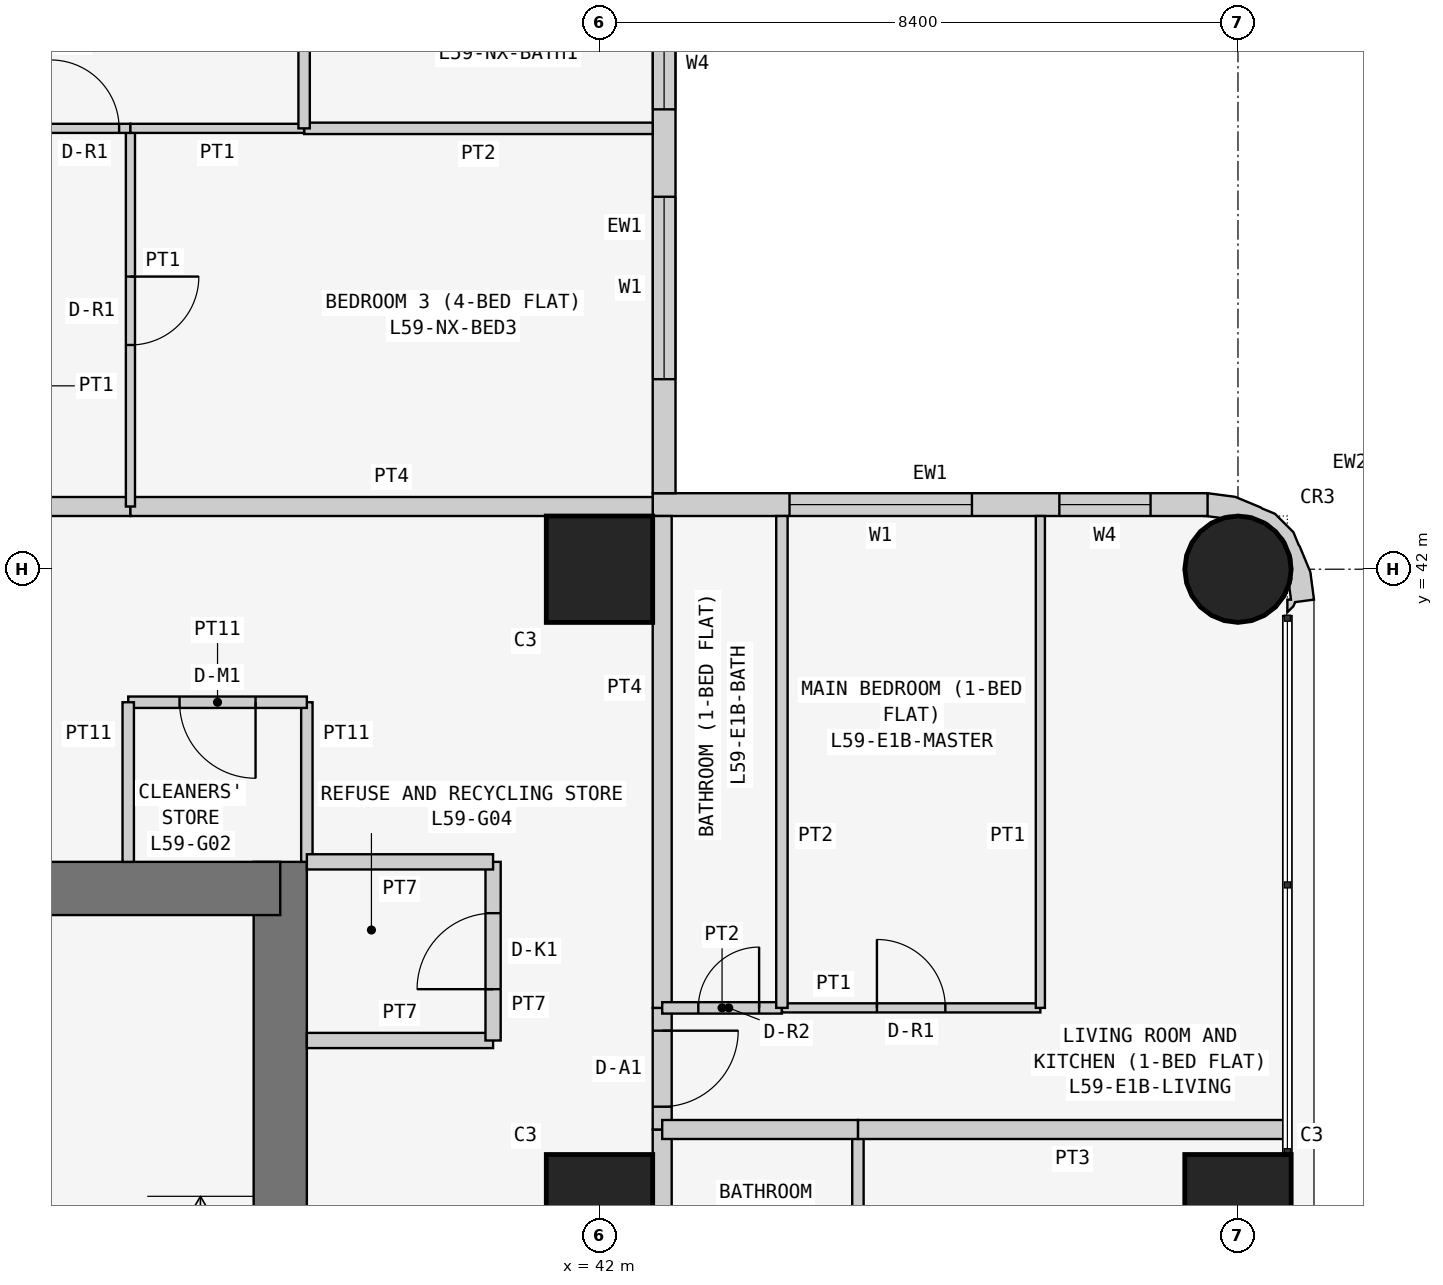
"""IFC4 building model, lengths in metres.
Left out: names, types, materials, properties, quantities, classifications, styles, units other than length and angle.
Written with IfcOpenShell. Run it as: python <this file> out.ifc"""

import sys

from ifc_helpers import new_model, si_unit, direction, frame, frame_2d, origin, origin_2d, place, context, subcontext, project, spatial, polyline, rectangle, circle, outline, extrude, element, fill, save


model = new_model("IFC4")
c1 = context("Model", 3, precision=1e-05, world=origin(), true_north=direction((0.0, 1.0)))
c2 = subcontext(c1, "Body", "Model", "MODEL_VIEW")
j1 = project(units=[si_unit("LENGTHUNIT", "METRE"), si_unit("PLANEANGLEUNIT", "RADIAN")], contexts=[c1])
p1 = place(None, origin())
s1 = spatial("IfcSite", under=j1, at=p1, CompositionType="ELEMENT")
p2 = place(p1, origin())
s2 = spatial("IfcBuilding", under=s1, at=p2, CompositionType="ELEMENT")
p3 = place(p2, frame((0.0, 0.0, 226.5)))
s3 = spatial("IfcBuildingStorey", under=s2, at=p3, CompositionType="ELEMENT", Elevation=226.5)
for number, where, z_axis, x_axis in (
    (1, (42.0, 33.6, 0.0), (0.0, 0.0, 1.0), (1.0, 0.0, 0.0)),
    (2, (42.0, 42.0, 0.0), (0.0, 0.0, 1.0), (1.0, 0.0, 0.0)),
    (3, (50.4, 33.6, 0.0), (0.0, 0.0, 1.0), (1.0, 0.0, 0.0)),
):
    element("IfcColumn", number, at=place(p3, frame(where, z_axis=z_axis, x_axis=x_axis)), inside=s3, PredefinedType="COLUMN", context=c2, shape_type="SweptSolid", body=[
        extrude(rectangle(XDim=1.4, YDim=1.4, at=origin_2d()), origin(), (0.0, 0.0, 1.0), 3.6),
    ])
p4 = place(p3, frame((50.4, 42.0, 0.0), z_axis=(0.0, 0.0, 1.0), x_axis=(1.0, 0.0, 0.0)))
e4 = element("IfcColumn", 4, at=p4, inside=s3, PredefinedType="COLUMN", context=c2, shape_type="SweptSolid", body=[
    extrude(circle(Radius=0.7, at=origin_2d()), origin(), (0.0, 0.0, 1.0), 3.6),
])
p5 = place(p3, frame((37.8, 21.0, 0.0), z_axis=(0.0, 0.0, 1.0), x_axis=(0.0, 1.0, 0.0)))
e5 = element("IfcWall", 5, at=p5, inside=s3, PredefinedType="SHEAR", context=c2, shape_type="SweptSolid", body=[
    extrude(rectangle(XDim=17.15, YDim=0.7, at=frame_2d((8.575, 0.0))), origin(), (0.0, 0.0, 1.0), 3.6),
])
p6 = place(p5, frame((5.2, 0.0, 0.0)))
e6 = element("IfcOpeningElement", 6, at=p6, cuts=e5, PredefinedType="OPENING", context=c2, shape_type="SweptSolid", body=[
    extrude(rectangle(XDim=1.2, YDim=2.1, at=frame_2d((0.6, 1.05))), frame((0.0, 0.36, 0.0), z_axis=(0.0, -1.0, 0.0), x_axis=(1.0, 0.0, 0.0)), (0.0, 0.0, 1.0), 0.72),
])
p7 = place(p3, frame((37.8, 37.8, 0.0), z_axis=(0.0, 0.0, 1.0), x_axis=(-1.0, 0.0, 0.0)))
e7 = element("IfcWall", 7, at=p7, inside=s3, PredefinedType="SHEAR", context=c2, shape_type="SweptSolid", body=[
    extrude(rectangle(XDim=17.15, YDim=0.7, at=frame_2d((8.575, 0.0))), origin(), (0.0, 0.0, 1.0), 3.6),
])
p8 = place(p3, frame((50.0, 42.85, 0.0), z_axis=(0.0, 0.0, 1.0), x_axis=(-1.0, 0.0, 0.0)))
e8 = element("IfcWall", 8, at=p8, inside=s3, PredefinedType="SOLIDWALL", context=c2, shape_type="SweptSolid", body=[
    extrude(rectangle(XDim=7.3, YDim=0.3, at=frame_2d((3.65, 0.0))), origin(), (0.0, 0.0, 1.0), 3.45),
])
p9 = place(p8, frame((3.1, 0.0, 0.9)))
e9 = element("IfcOpeningElement", 9, at=p9, cuts=e8, PredefinedType="OPENING", context=c2, shape_type="SweptSolid", body=[
    extrude(rectangle(XDim=2.4, YDim=1.5, at=frame_2d((1.2, 0.75))), frame((0.0, 0.16, 0.0), z_axis=(0.0, -1.0, 0.0), x_axis=(1.0, 0.0, 0.0)), (0.0, 0.0, 1.0), 0.32),
])
p10 = place(p8, frame((0.75, 0.0, 0.9)))
e10 = element("IfcOpeningElement", 10, at=p10, cuts=e8, PredefinedType="OPENING", context=c2, shape_type="SweptSolid", body=[
    extrude(rectangle(XDim=1.2, YDim=1.5, at=frame_2d((0.6, 0.75))), frame((0.0, 0.16, 0.0), z_axis=(0.0, -1.0, 0.0), x_axis=(1.0, 0.0, 0.0)), (0.0, 0.0, 1.0), 0.32),
])
p11 = place(p3, frame((42.85, 43.0, 0.0), z_axis=(0.0, 0.0, 1.0), x_axis=(0.0, 1.0, 0.0)))
e11 = element("IfcWall", 11, at=p11, inside=s3, PredefinedType="SOLIDWALL", context=c2, shape_type="SweptSolid", body=[
    extrude(rectangle(XDim=7.0, YDim=0.3, at=frame_2d((3.5, 0.0))), origin(), (0.0, 0.0, 1.0), 3.45),
])
p12 = place(p11, frame((1.5, 0.0, 0.9)))
e12 = element("IfcOpeningElement", 12, at=p12, cuts=e11, PredefinedType="OPENING", context=c2, shape_type="SweptSolid", body=[
    extrude(rectangle(XDim=2.4, YDim=1.5, at=frame_2d((1.2, 0.75))), frame((0.0, 0.16, 0.0), z_axis=(0.0, -1.0, 0.0), x_axis=(1.0, 0.0, 0.0)), (0.0, 0.0, 1.0), 0.32),
])
p13 = place(p11, frame((5.05, 0.0, 0.9)))
e13 = element("IfcOpeningElement", 13, at=p13, cuts=e11, PredefinedType="OPENING", context=c2, shape_type="SweptSolid", body=[
    extrude(rectangle(XDim=1.2, YDim=1.5, at=frame_2d((0.6, 0.75))), frame((0.0, 0.16, 0.0), z_axis=(0.0, -1.0, 0.0), x_axis=(1.0, 0.0, 0.0)), (0.0, 0.0, 1.0), 0.32),
])
p14 = place(p3, frame((50.988, 41.488, 0.0), z_axis=(0.0, 0.0, 1.0), x_axis=(0.898030234854, 0.439933741929, 0.0)))
e14 = element("IfcWall", 14, at=p14, inside=s3, PredefinedType="SOLIDWALL", context=c2, shape_type="SweptSolid", body=[
    extrude(outline(polyline([(0.138, -0.04), (0.182, -0.0), (0.419, -0.08), (0.536, 0.266), (0.559, 0.631), (0.555, 0.651), (0.566, 0.836), (0.455, 1.159), (0.333, 1.298), (0.324, 1.317), (0.082, 1.591), (-0.222, 1.793), (-0.39, 1.541), (-0.372, 1.532), (-0.195, 1.414), (-0.12, 1.41), (0.131, 1.287), (0.315, 1.078), (0.406, 0.814), (0.388, 0.536), (0.265, 0.285), (0.209, 0.235), (0.148, 0.053), (0.105, 0.074), (0.032, -0.076), (0.138, -0.04)])), origin(), (0.0, 0.0, 1.0), 3.45),
])
p15 = place(p3, frame((38.15, 38.15, 0.0), z_axis=(0.0, 0.0, 1.0), x_axis=(0.0, 1.0, 0.0)))
e15 = element("IfcWall", 15, at=p15, inside=s3, PredefinedType="PARTITIONING", context=c2, shape_type="SweptSolid", body=[
    extrude(rectangle(XDim=2.1, YDim=0.15, at=frame_2d((1.05, 0.0))), origin(), (0.0, 0.0, 1.0), 3.45),
])
p16 = place(p3, frame((38.15, 40.25, 0.0), z_axis=(0.0, 0.0, 1.0), x_axis=(-1.0, 0.0, 0.0)))
e16 = element("IfcWall", 16, at=p16, inside=s3, PredefinedType="PARTITIONING", context=c2, shape_type="SweptSolid", body=[
    extrude(rectangle(XDim=2.35, YDim=0.15, at=frame_2d((1.175, 0.0))), origin(), (0.0, 0.0, 1.0), 3.45),
])
p17 = place(p16, frame((0.675, 0.0, 0.0)))
e17 = element("IfcOpeningElement", 17, at=p17, cuts=e16, PredefinedType="OPENING", context=c2, shape_type="SweptSolid", body=[
    extrude(rectangle(XDim=1.0, YDim=2.1, at=frame_2d((0.5, 1.05))), frame((0.0, 0.085, 0.0), z_axis=(0.0, -1.0, 0.0), x_axis=(1.0, 0.0, 0.0)), (0.0, 0.0, 1.0), 0.17),
])
p18 = place(p3, frame((35.8, 40.25, 0.0), z_axis=(0.0, 0.0, 1.0), x_axis=(0.0, -1.0, 0.0)))
e18 = element("IfcWall", 18, at=p18, inside=s3, PredefinedType="PARTITIONING", context=c2, shape_type="SweptSolid", body=[
    extrude(rectangle(XDim=2.1, YDim=0.15, at=frame_2d((1.05, 0.0))), origin(), (0.0, 0.0, 1.0), 3.45),
])
p19 = place(p3, frame((38.15, 35.8, 0.0), z_axis=(0.0, 0.0, 1.0), x_axis=(1.0, 0.0, 0.0)))
e19 = element("IfcWall", 19, at=p19, inside=s3, PredefinedType="PARTITIONING", context=c2, shape_type="SweptSolid", body=[
    extrude(rectangle(XDim=2.45, YDim=0.2, at=frame_2d((1.225, 0.0))), origin(), (0.0, 0.0, 1.0), 3.45),
])
p20 = place(p3, frame((40.6, 35.8, 0.0), z_axis=(0.0, 0.0, 1.0), x_axis=(0.0, 1.0, 0.0)))
e20 = element("IfcWall", 20, at=p20, inside=s3, PredefinedType="PARTITIONING", context=c2, shape_type="SweptSolid", body=[
    extrude(rectangle(XDim=2.35, YDim=0.2, at=frame_2d((1.175, 0.0))), origin(), (0.0, 0.0, 1.0), 3.45),
])
p21 = place(p20, frame((0.675, 0.0, 0.0)))
e21 = element("IfcOpeningElement", 21, at=p21, cuts=e20, PredefinedType="OPENING", context=c2, shape_type="SweptSolid", body=[
    extrude(rectangle(XDim=1.0, YDim=2.1, at=frame_2d((0.5, 1.05))), frame((0.0, 0.11, 0.0), z_axis=(0.0, -1.0, 0.0), x_axis=(1.0, 0.0, 0.0)), (0.0, 0.0, 1.0), 0.22),
])
p22 = place(p3, frame((40.6, 38.15, 0.0), z_axis=(0.0, 0.0, 1.0), x_axis=(-1.0, 0.0, 0.0)))
e22 = element("IfcWall", 22, at=p22, inside=s3, PredefinedType="PARTITIONING", context=c2, shape_type="SweptSolid", body=[
    extrude(rectangle(XDim=2.45, YDim=0.2, at=frame_2d((1.225, 0.0))), origin(), (0.0, 0.0, 1.0), 3.45),
])
p23 = place(p3, frame((34.629, 42.825, 0.0), z_axis=(0.0, 0.0, 1.0), x_axis=(1.0, 0.0, 0.0)))
e23 = element("IfcWall", 23, at=p23, inside=s3, PredefinedType="PARTITIONING", context=c2, shape_type="SweptSolid", body=[
    extrude(rectangle(XDim=1.2, YDim=0.25, at=frame_2d((0.6, 0.0))), origin(), (0.0, 0.0, 1.0), 3.45),
])
p24 = place(p3, frame((35.829, 42.825, 0.0), z_axis=(0.0, 0.0, 1.0), x_axis=(1.0, 0.0, 0.0)))
e24 = element("IfcWall", 24, at=p24, inside=s3, PredefinedType="PARTITIONING", context=c2, shape_type="SweptSolid", body=[
    extrude(rectangle(XDim=6.871, YDim=0.25, at=frame_2d((3.436, 0.0))), origin(), (0.0, 0.0, 1.0), 3.45),
])
p25 = place(p3, frame((42.825, 34.629, 0.0), z_axis=(0.0, 0.0, 1.0), x_axis=(0.0, -1.0, 0.0)))
e25 = element("IfcWall", 25, at=p25, inside=s3, PredefinedType="PARTITIONING", context=c2, shape_type="SweptSolid", body=[
    extrude(rectangle(XDim=2.629, YDim=0.25, at=frame_2d((1.314, 0.0))), origin(), (0.0, 0.0, 1.0), 3.45),
])
p26 = place(p3, frame((42.825, 36.229, 0.0), z_axis=(0.0, 0.0, 1.0), x_axis=(0.0, -1.0, 0.0)))
e26 = element("IfcWall", 26, at=p26, inside=s3, PredefinedType="PARTITIONING", context=c2, shape_type="SweptSolid", body=[
    extrude(rectangle(XDim=1.6, YDim=0.25, at=frame_2d((0.8, 0.0))), origin(), (0.0, 0.0, 1.0), 3.45),
])
p27 = place(p26, frame((0.3, 0.0, 0.0)))
e27 = element("IfcOpeningElement", 27, at=p27, cuts=e26, PredefinedType="OPENING", context=c2, shape_type="SweptSolid", body=[
    extrude(rectangle(XDim=1.0, YDim=2.1, at=frame_2d((0.5, 1.05))), frame((0.0, 0.135, 0.0), z_axis=(0.0, -1.0, 0.0), x_axis=(1.0, 0.0, 0.0)), (0.0, 0.0, 1.0), 0.27),
])
p28 = place(p3, frame((42.825, 42.7, 0.0), z_axis=(0.0, 0.0, 1.0), x_axis=(0.0, -1.0, 0.0)))
e28 = element("IfcWall", 28, at=p28, inside=s3, PredefinedType="PARTITIONING", context=c2, shape_type="SweptSolid", body=[
    extrude(rectangle(XDim=6.471, YDim=0.25, at=frame_2d((3.235, 0.0))), origin(), (0.0, 0.0, 1.0), 3.45),
])
p29 = place(p3, frame((35.829, 47.8, 0.0), z_axis=(0.0, 0.0, 1.0), x_axis=(0.0, -1.0, 0.0)))
e29 = element("IfcWall", 29, at=p29, inside=s3, PredefinedType="PARTITIONING", context=c2, shape_type="SweptSolid", body=[
    extrude(rectangle(XDim=4.975, YDim=0.12, at=frame_2d((2.488, 0.0))), origin(), (0.0, 0.0, 1.0), 3.45),
])
p30 = place(p29, frame((1.95, 0.0, 0.0)))
e30 = element("IfcOpeningElement", 30, at=p30, cuts=e29, PredefinedType="OPENING", context=c2, shape_type="SweptSolid", body=[
    extrude(rectangle(XDim=0.9, YDim=2.1, at=frame_2d((0.45, 1.05))), frame((0.0, 0.07, 0.0), z_axis=(0.0, -1.0, 0.0), x_axis=(1.0, 0.0, 0.0)), (0.0, 0.0, 1.0), 0.14),
])
p31 = place(p3, frame((34.629, 47.8, 0.0), z_axis=(0.0, 0.0, 1.0), x_axis=(1.0, 0.0, 0.0)))
e31 = element("IfcWall", 31, at=p31, inside=s3, PredefinedType="PARTITIONING", context=c2, shape_type="SweptSolid", body=[
    extrude(rectangle(XDim=1.2, YDim=0.12, at=frame_2d((0.6, 0.0))), origin(), (0.0, 0.0, 1.0), 3.45),
])
p32 = place(p31, frame((0.151, 0.0, 0.0)))
e32 = element("IfcOpeningElement", 32, at=p32, cuts=e31, PredefinedType="OPENING", context=c2, shape_type="SweptSolid", body=[
    extrude(rectangle(XDim=0.9, YDim=2.1, at=frame_2d((0.45, 1.05))), frame((0.0, 0.07, 0.0), z_axis=(0.0, -1.0, 0.0), x_axis=(1.0, 0.0, 0.0)), (0.0, 0.0, 1.0), 0.14),
])
p33 = place(p3, frame((42.7, 47.8, 0.0), z_axis=(0.0, 0.0, 1.0), x_axis=(-1.0, 0.0, 0.0)))
e33 = element("IfcWall", 33, at=p33, inside=s3, PredefinedType="PARTITIONING", context=c2, shape_type="SweptSolid", body=[
    extrude(rectangle(XDim=4.586, YDim=0.15, at=frame_2d((2.293, 0.0))), origin(), (0.0, 0.0, 1.0), 3.45),
])
p34 = place(p3, frame((38.114, 47.8, 0.0), z_axis=(0.0, 0.0, 1.0), x_axis=(-1.0, 0.0, 0.0)))
e34 = element("IfcWall", 34, at=p34, inside=s3, PredefinedType="PARTITIONING", context=c2, shape_type="SweptSolid", body=[
    extrude(rectangle(XDim=2.285, YDim=0.12, at=frame_2d((1.143, 0.0))), origin(), (0.0, 0.0, 1.0), 3.45),
])
p35 = place(p3, frame((38.114, 51.05, 0.0), z_axis=(0.0, 0.0, 1.0), x_axis=(0.0, -1.0, 0.0)))
e35 = element("IfcWall", 35, at=p35, inside=s3, PredefinedType="PARTITIONING", context=c2, shape_type="SweptSolid", body=[
    extrude(rectangle(XDim=3.25, YDim=0.15, at=frame_2d((1.625, 0.0))), origin(), (0.0, 0.0, 1.0), 3.45),
])
p36 = place(p35, frame((1.35, 0.0, 0.0)))
e36 = element("IfcOpeningElement", 36, at=p36, cuts=e35, PredefinedType="OPENING", context=c2, shape_type="SweptSolid", body=[
    extrude(rectangle(XDim=0.8, YDim=2.1, at=frame_2d((0.4, 1.05))), frame((0.0, 0.085, 0.0), z_axis=(0.0, -1.0, 0.0), x_axis=(1.0, 0.0, 0.0)), (0.0, 0.0, 1.0), 0.17),
])
p37 = place(p3, frame((45.4, 32.0, 0.0), z_axis=(0.0, 0.0, 1.0), x_axis=(0.0, 1.0, 0.0)))
e37 = element("IfcWall", 37, at=p37, inside=s3, PredefinedType="PARTITIONING", context=c2, shape_type="SweptSolid", body=[
    extrude(rectangle(XDim=2.629, YDim=0.15, at=frame_2d((1.314, 0.0))), origin(), (0.0, 0.0, 1.0), 3.45),
])
p38 = place(p3, frame((45.4, 34.629, 0.0), z_axis=(0.0, 0.0, 1.0), x_axis=(1.0, 0.0, 0.0)))
e38 = element("IfcWall", 38, at=p38, inside=s3, PredefinedType="PARTITIONING", context=c2, shape_type="SweptSolid", body=[
    extrude(rectangle(XDim=5.65, YDim=0.25, at=frame_2d((2.825, 0.0))), origin(), (0.0, 0.0, 1.0), 3.45),
])
p39 = place(p3, frame((45.4, 34.629, 0.0), z_axis=(0.0, 0.0, 1.0), x_axis=(-1.0, 0.0, 0.0)))
e39 = element("IfcWall", 39, at=p39, inside=s3, PredefinedType="PARTITIONING", context=c2, shape_type="SweptSolid", body=[
    extrude(rectangle(XDim=2.575, YDim=0.25, at=frame_2d((1.288, 0.0))), origin(), (0.0, 0.0, 1.0), 3.45),
])
p40 = place(p3, frame((42.825, 36.229, 0.0), z_axis=(0.0, 0.0, 1.0), x_axis=(1.0, 0.0, 0.0)))
e40 = element("IfcWall", 40, at=p40, inside=s3, PredefinedType="PARTITIONING", context=c2, shape_type="SweptSolid", body=[
    extrude(rectangle(XDim=1.575, YDim=0.15, at=frame_2d((0.788, 0.0))), origin(), (0.0, 0.0, 1.0), 3.45),
])
p41 = place(p40, frame((0.475, 0.0, 0.0)))
e41 = element("IfcOpeningElement", 41, at=p41, cuts=e40, PredefinedType="OPENING", context=c2, shape_type="SweptSolid", body=[
    extrude(rectangle(XDim=0.8, YDim=2.1, at=frame_2d((0.4, 1.05))), frame((0.0, 0.085, 0.0), z_axis=(0.0, -1.0, 0.0), x_axis=(1.0, 0.0, 0.0)), (0.0, 0.0, 1.0), 0.17),
])
p42 = place(p3, frame((44.4, 36.229, 0.0), z_axis=(0.0, 0.0, 1.0), x_axis=(1.0, 0.0, 0.0)))
e42 = element("IfcWall", 42, at=p42, inside=s3, PredefinedType="PARTITIONING", context=c2, shape_type="SweptSolid", body=[
    extrude(rectangle(XDim=3.4, YDim=0.12, at=frame_2d((1.7, 0.0))), origin(), (0.0, 0.0, 1.0), 3.45),
])
p43 = place(p42, frame((1.25, 0.0, 0.0)))
e43 = element("IfcOpeningElement", 43, at=p43, cuts=e42, PredefinedType="OPENING", context=c2, shape_type="SweptSolid", body=[
    extrude(rectangle(XDim=0.9, YDim=2.1, at=frame_2d((0.45, 1.05))), frame((0.0, 0.07, 0.0), z_axis=(0.0, -1.0, 0.0), x_axis=(1.0, 0.0, 0.0)), (0.0, 0.0, 1.0), 0.14),
])
p44 = place(p3, frame((47.8, 36.229, 0.0), z_axis=(0.0, 0.0, 1.0), x_axis=(0.0, 1.0, 0.0)))
e44 = element("IfcWall", 44, at=p44, inside=s3, PredefinedType="PARTITIONING", context=c2, shape_type="SweptSolid", body=[
    extrude(rectangle(XDim=6.471, YDim=0.12, at=frame_2d((3.235, 0.0))), origin(), (0.0, 0.0, 1.0), 3.45),
])
p45 = place(p3, frame((44.4, 36.229, 0.0), z_axis=(0.0, 0.0, 1.0), x_axis=(0.0, 1.0, 0.0)))
e45 = element("IfcWall", 45, at=p45, inside=s3, PredefinedType="PARTITIONING", context=c2, shape_type="SweptSolid", body=[
    extrude(rectangle(XDim=6.471, YDim=0.15, at=frame_2d((3.235, 0.0))), origin(), (0.0, 0.0, 1.0), 3.45),
])
p46 = place(p12, origin())
e46 = element("IfcWindow", 46, at=p46, inside=s3, PartitioningType="SINGLE_PANEL", PredefinedType="WINDOW", context=c2, shape_type="SweptSolid", body=[
    extrude(rectangle(XDim=2.4, YDim=1.5, at=frame_2d((1.2, 0.75))), frame((0.0, 0.03, 0.0), z_axis=(0.0, -1.0, 0.0), x_axis=(1.0, 0.0, 0.0)), (0.0, 0.0, 1.0), 0.06),
])
fill(e12, e46)
p47 = place(p13, origin())
e47 = element("IfcWindow", 47, at=p47, inside=s3, PartitioningType="SINGLE_PANEL", PredefinedType="WINDOW", context=c2, shape_type="SweptSolid", body=[
    extrude(rectangle(XDim=1.2, YDim=1.5, at=frame_2d((0.6, 0.75))), frame((0.0, 0.03, 0.0), z_axis=(0.0, -1.0, 0.0), x_axis=(1.0, 0.0, 0.0)), (0.0, 0.0, 1.0), 0.06),
])
fill(e13, e47)
p48 = place(p9, origin())
e48 = element("IfcWindow", 48, at=p48, inside=s3, PartitioningType="SINGLE_PANEL", PredefinedType="WINDOW", context=c2, shape_type="SweptSolid", body=[
    extrude(rectangle(XDim=2.4, YDim=1.5, at=frame_2d((1.2, 0.75))), frame((0.0, 0.03, 0.0), z_axis=(0.0, -1.0, 0.0), x_axis=(1.0, 0.0, 0.0)), (0.0, 0.0, 1.0), 0.06),
])
fill(e9, e48)
p49 = place(p10, origin())
e49 = element("IfcWindow", 49, at=p49, inside=s3, PartitioningType="SINGLE_PANEL", PredefinedType="WINDOW", context=c2, shape_type="SweptSolid", body=[
    extrude(rectangle(XDim=1.2, YDim=1.5, at=frame_2d((0.6, 0.75))), frame((0.0, 0.03, 0.0), z_axis=(0.0, -1.0, 0.0), x_axis=(1.0, 0.0, 0.0)), (0.0, 0.0, 1.0), 0.06),
])
fill(e10, e49)
p50 = place(p17, origin())
e50 = element("IfcDoor", 50, at=p50, inside=s3, OperationType="SINGLE_SWING_LEFT", PredefinedType="DOOR", context=c2, shape_type="SweptSolid", body=[
    extrude(rectangle(XDim=1.0, YDim=2.1, at=frame_2d((0.5, 1.05))), frame((0.0, 0.025, 0.0), z_axis=(0.0, -1.0, 0.0), x_axis=(1.0, 0.0, 0.0)), (0.0, 0.0, 1.0), 0.05),
])
fill(e17, e50)
p51 = place(p21, origin())
e51 = element("IfcDoor", 51, at=p51, inside=s3, OperationType="SINGLE_SWING_LEFT", PredefinedType="DOOR", context=c2, shape_type="SweptSolid", body=[
    extrude(rectangle(XDim=1.0, YDim=2.1, at=frame_2d((0.5, 1.05))), frame((0.0, 0.025, 0.0), z_axis=(0.0, -1.0, 0.0), x_axis=(1.0, 0.0, 0.0)), (0.0, 0.0, 1.0), 0.05),
])
fill(e21, e51)
p52 = place(p30, origin())
e52 = element("IfcDoor", 52, at=p52, inside=s3, OperationType="SINGLE_SWING_LEFT", PredefinedType="DOOR", context=c2, shape_type="SweptSolid", body=[
    extrude(rectangle(XDim=0.9, YDim=2.1, at=frame_2d((0.45, 1.05))), frame((0.0, 0.025, 0.0), z_axis=(0.0, -1.0, 0.0), x_axis=(1.0, 0.0, 0.0)), (0.0, 0.0, 1.0), 0.05),
])
fill(e30, e52)
p53 = place(p32, origin())
e53 = element("IfcDoor", 53, at=p53, inside=s3, OperationType="SINGLE_SWING_LEFT", PredefinedType="DOOR", context=c2, shape_type="SweptSolid", body=[
    extrude(rectangle(XDim=0.9, YDim=2.1, at=frame_2d((0.45, 1.05))), frame((0.0, 0.025, 0.0), z_axis=(0.0, -1.0, 0.0), x_axis=(1.0, 0.0, 0.0)), (0.0, 0.0, 1.0), 0.05),
])
fill(e32, e53)
p54 = place(p27, origin())
e54 = element("IfcDoor", 54, at=p54, inside=s3, OperationType="SINGLE_SWING_LEFT", PredefinedType="DOOR", context=c2, shape_type="SweptSolid", body=[
    extrude(rectangle(XDim=1.0, YDim=2.1, at=frame_2d((0.5, 1.05))), frame((0.0, 0.025, 0.0), z_axis=(0.0, -1.0, 0.0), x_axis=(1.0, 0.0, 0.0)), (0.0, 0.0, 1.0), 0.05),
])
fill(e27, e54)
p55 = place(p41, origin())
e55 = element("IfcDoor", 55, at=p55, inside=s3, OperationType="SINGLE_SWING_RIGHT", PredefinedType="DOOR", context=c2, shape_type="SweptSolid", body=[
    extrude(rectangle(XDim=0.8, YDim=2.1, at=frame_2d((0.4, 1.05))), frame((0.0, 0.025, 0.0), z_axis=(0.0, -1.0, 0.0), x_axis=(1.0, 0.0, 0.0)), (0.0, 0.0, 1.0), 0.05),
])
fill(e41, e55)
p56 = place(p43, origin())
e56 = element("IfcDoor", 56, at=p56, inside=s3, OperationType="SINGLE_SWING_LEFT", PredefinedType="DOOR", context=c2, shape_type="SweptSolid", body=[
    extrude(rectangle(XDim=0.9, YDim=2.1, at=frame_2d((0.45, 1.05))), frame((0.0, 0.025, 0.0), z_axis=(0.0, -1.0, 0.0), x_axis=(1.0, 0.0, 0.0)), (0.0, 0.0, 1.0), 0.05),
])
fill(e43, e56)
save(model, sys.argv[1])
